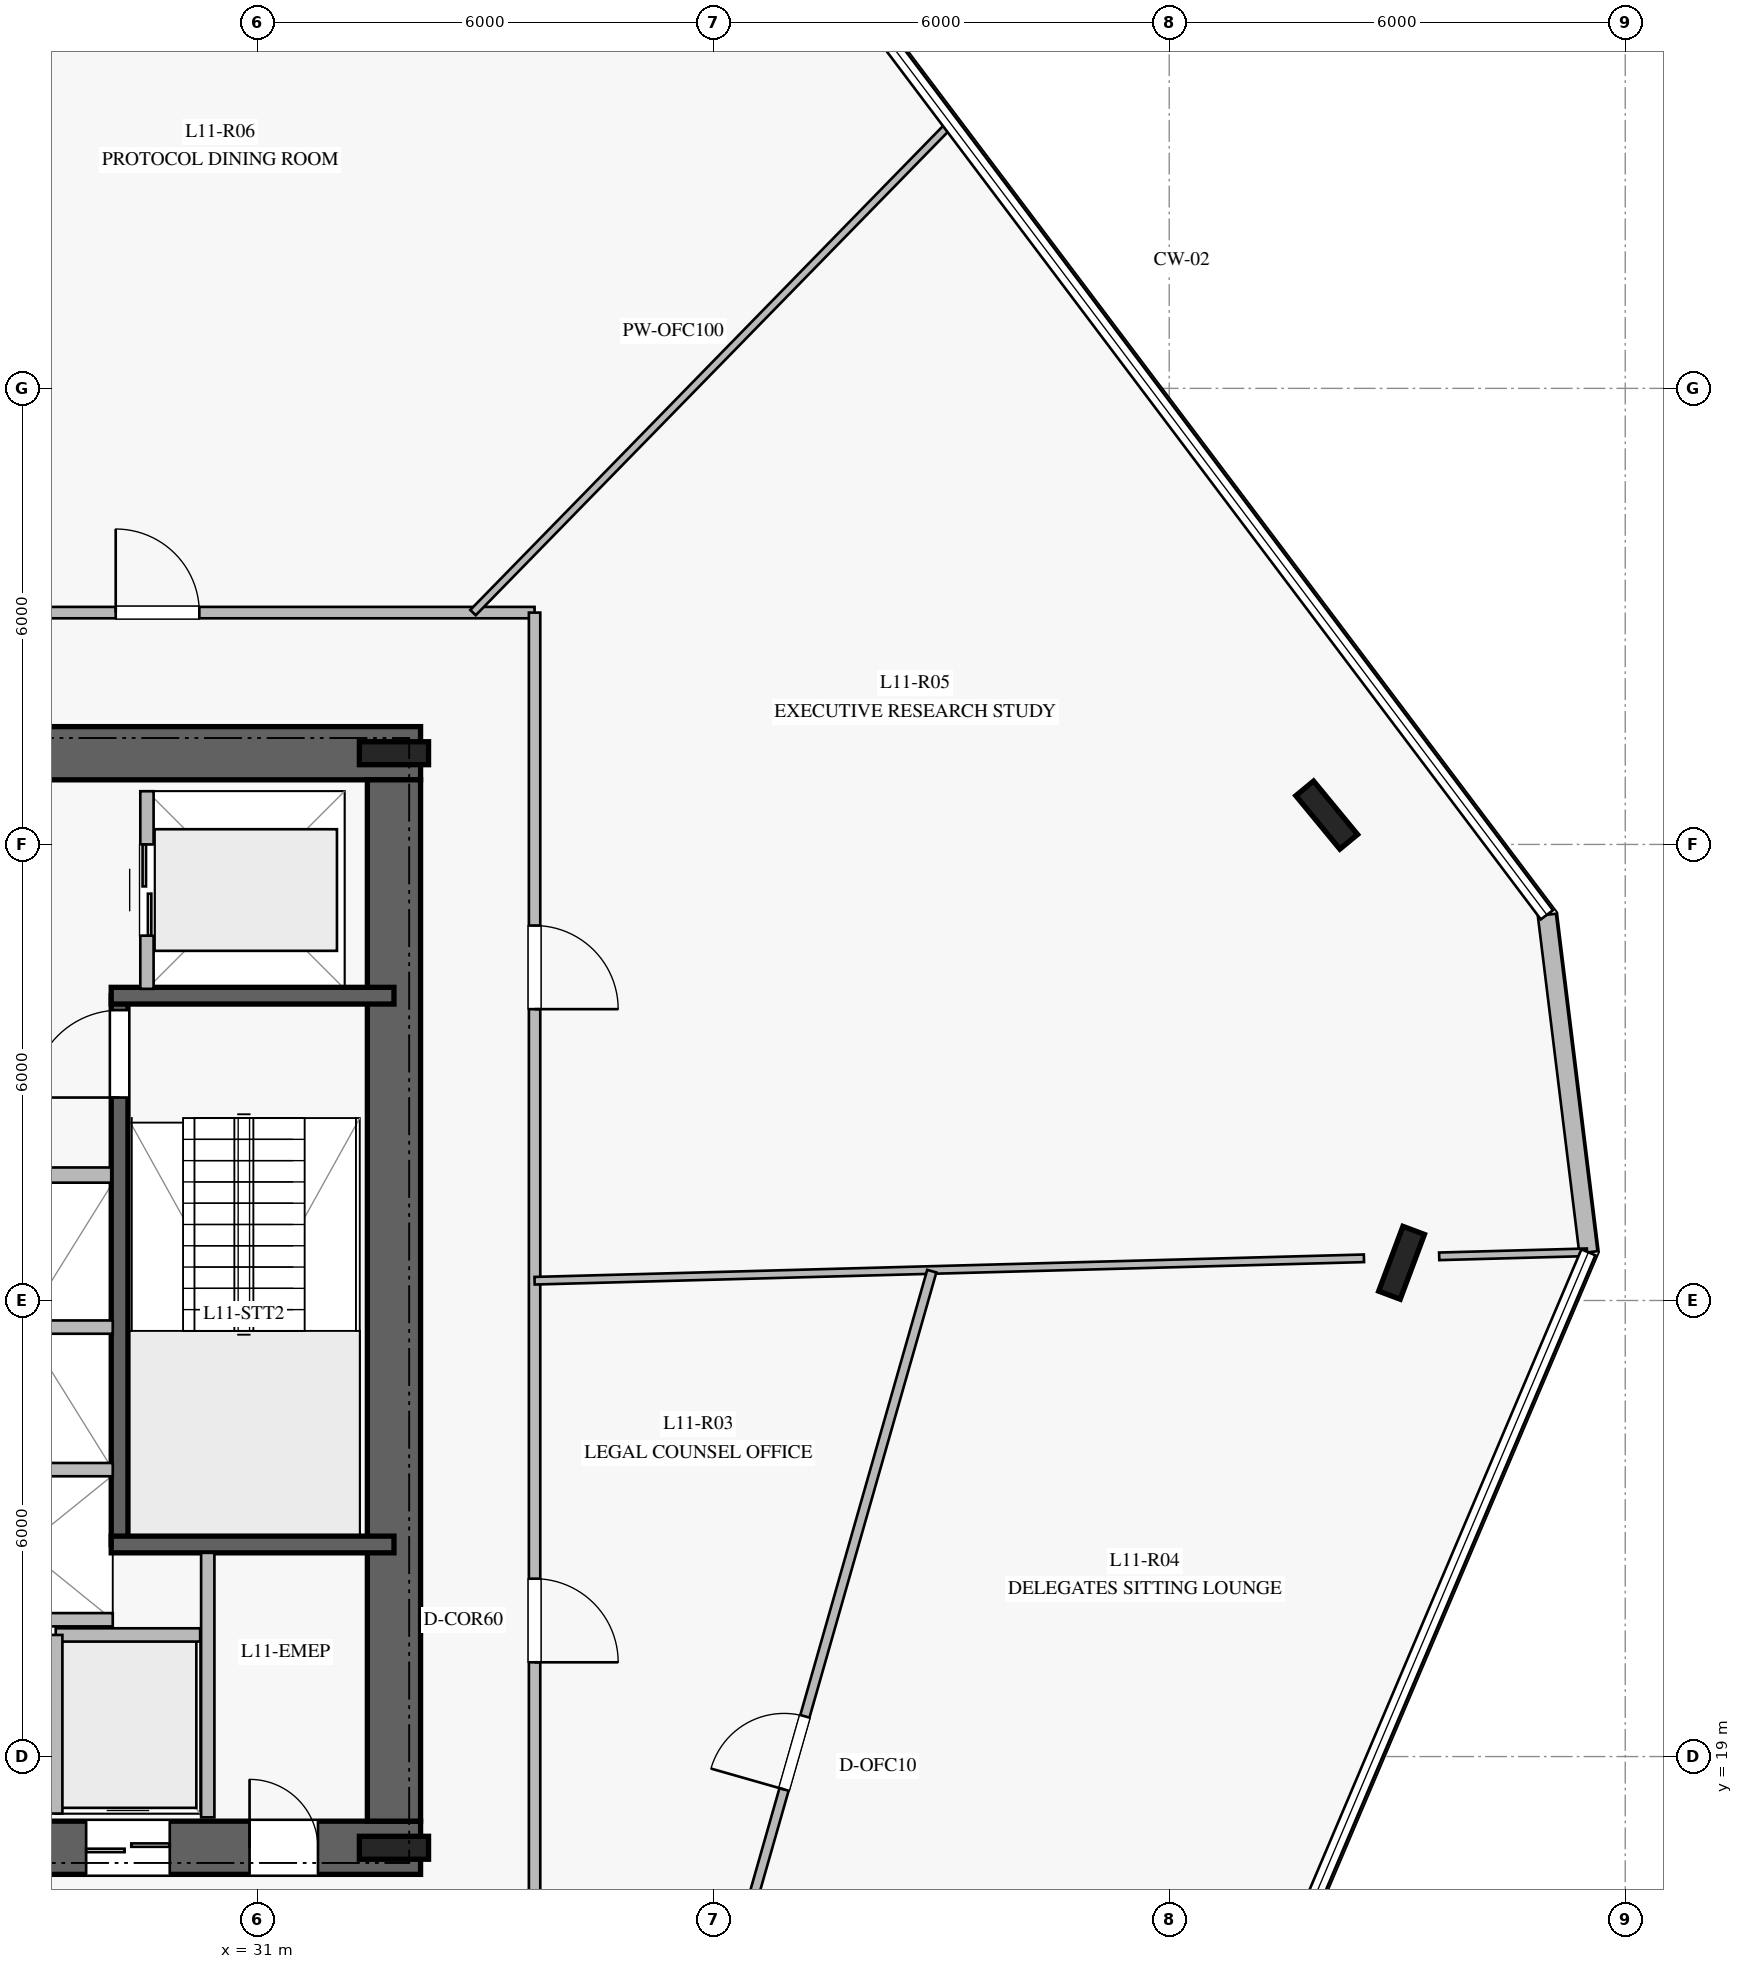
"""IFC4 building model, lengths in metres.
Left out: names, types, materials, properties, quantities, classifications, styles, units other than length and angle.
Written with IfcOpenShell. Run it as: python <this file> out.ifc"""

import sys

from ifc_helpers import new_model, si_unit, direction, frame, frame_2d, origin, origin_2d, place, context, subcontext, project, spatial, rectangle, i_section, extrude, element, fill, save


model = new_model("IFC4")
c1 = context("Model", 3, precision=1e-05, world=origin(), true_north=direction((0.0, 1.0)))
c2 = subcontext(c1, "Body", "Model", "MODEL_VIEW")
j1 = project(units=[si_unit("LENGTHUNIT", "METRE"), si_unit("PLANEANGLEUNIT", "RADIAN")], contexts=[c1])
p1 = place(None, origin())
s1 = spatial("IfcSite", under=j1, at=p1, CompositionType="ELEMENT")
p2 = place(p1, origin())
s2 = spatial("IfcBuilding", under=s1, at=p2, CompositionType="ELEMENT")
p3 = place(p2, frame((0.0, 0.0, 48.0)))
s3 = spatial("IfcBuildingStorey", under=s2, at=p3, CompositionType="ELEMENT", Elevation=48.0)
p4 = place(p3, frame((16.85, 17.8, 0.0), z_axis=(0.0, 0.0, 1.0), x_axis=(1.0, 0.0, 0.0)))
e1 = element("IfcWall", 1, at=p4, inside=s3, PredefinedType="SHEAR", context=c2, shape_type="SweptSolid", body=[
    extrude(rectangle(XDim=16.3, YDim=0.7, at=frame_2d((8.15, 0.0))), origin(), (0.0, 0.0, 1.0), 3.76),
])
p5 = place(p4, frame((5.1, 0.0, 0.0)))
e2 = element("IfcOpeningElement", 2, at=p5, cuts=e1, PredefinedType="OPENING", context=c2, shape_type="SweptSolid", body=[
    extrude(rectangle(XDim=1.2, YDim=2.25, at=frame_2d((0.6, 1.125))), frame((0.0, 0.36, 0.0), z_axis=(0.0, -1.0, 0.0), x_axis=(1.0, 0.0, 0.0)), (0.0, 0.0, 1.0), 0.72),
])
p6 = place(p4, frame((14.05, 0.0, 0.0)))
e3 = element("IfcOpeningElement", 3, at=p6, cuts=e1, PredefinedType="OPENING", context=c2, shape_type="SweptSolid", body=[
    extrude(rectangle(XDim=0.9, YDim=2.1, at=frame_2d((0.45, 1.05))), frame((0.0, 0.36, 0.0), z_axis=(0.0, -1.0, 0.0), x_axis=(1.0, 0.0, 0.0)), (0.0, 0.0, 1.0), 0.72),
])
p7 = place(p4, frame((7.95, 0.0, 0.0)))
e4 = element("IfcOpeningElement", 4, at=p7, cuts=e1, PredefinedType="OPENING", context=c2, shape_type="SweptSolid", body=[
    extrude(rectangle(XDim=1.1, YDim=2.2, at=frame_2d((0.55, 1.1))), frame((0.0, 0.36, 0.0), z_axis=(0.0, -1.0, 0.0), x_axis=(1.0, 0.0, 0.0)), (0.0, 0.0, 1.0), 0.72),
])
p8 = place(p4, frame((9.925, 0.0, 0.0)))
e5 = element("IfcOpeningElement", 5, at=p8, cuts=e1, PredefinedType="OPENING", context=c2, shape_type="SweptSolid", body=[
    extrude(rectangle(XDim=1.1, YDim=2.2, at=frame_2d((0.55, 1.1))), frame((0.0, 0.36, 0.0), z_axis=(0.0, -1.0, 0.0), x_axis=(1.0, 0.0, 0.0)), (0.0, 0.0, 1.0), 0.72),
])
p9 = place(p4, frame((11.9, 0.0, 0.0)))
e6 = element("IfcOpeningElement", 6, at=p9, cuts=e1, PredefinedType="OPENING", context=c2, shape_type="SweptSolid", body=[
    extrude(rectangle(XDim=1.1, YDim=2.2, at=frame_2d((0.55, 1.1))), frame((0.0, 0.36, 0.0), z_axis=(0.0, -1.0, 0.0), x_axis=(1.0, 0.0, 0.0)), (0.0, 0.0, 1.0), 0.72),
])
p10 = place(p3, frame((33.15, 32.2, 0.0), z_axis=(0.0, 0.0, 1.0), x_axis=(-1.0, 0.0, 0.0)))
e7 = element("IfcWall", 7, at=p10, inside=s3, PredefinedType="SHEAR", context=c2, shape_type="SweptSolid", body=[
    extrude(rectangle(XDim=16.3, YDim=0.7, at=frame_2d((8.15, 0.0))), origin(), (0.0, 0.0, 1.0), 3.76),
])
p11 = place(p10, frame((5.1, 0.0, 0.0)))
e8 = element("IfcOpeningElement", 8, at=p11, cuts=e7, PredefinedType="OPENING", context=c2, shape_type="SweptSolid", body=[
    extrude(rectangle(XDim=1.2, YDim=2.25, at=frame_2d((0.6, 1.125))), frame((0.0, 0.36, 0.0), z_axis=(0.0, -1.0, 0.0), x_axis=(1.0, 0.0, 0.0)), (0.0, 0.0, 1.0), 0.72),
])
p12 = place(p3, frame((32.8, 18.15, 0.0), z_axis=(0.0, 0.0, 1.0), x_axis=(0.0, 1.0, 0.0)))
e9 = element("IfcWall", 9, at=p12, inside=s3, PredefinedType="SHEAR", context=c2, shape_type="SweptSolid", body=[
    extrude(rectangle(XDim=13.7, YDim=0.7, at=frame_2d((6.85, 0.0))), origin(), (0.0, 0.0, 1.0), 3.76),
])
for number, where, z_axis, x_axis in (
    (10, (32.8, 17.8, 0.0), (0.0, 0.0, 1.0), (1.0, 0.0, 0.0)),
    (11, (32.8, 32.2, 0.0), (0.0, 0.0, 1.0), (1.0, 0.0, 0.0)),
):
    element("IfcColumn", number, at=place(p3, frame(where, z_axis=z_axis, x_axis=x_axis)), inside=s3, PredefinedType="COLUMN", context=c2, shape_type="SweptSolid", body=[
        extrude(i_section(OverallWidth=0.302, OverallDepth=0.91, WebThickness=0.021, FlangeThickness=0.04, at=origin_2d()), origin(), (0.0, 0.0, 1.0), 4.0),
    ])
p13 = place(p3, frame((29.19, 21.79, 0.0), z_axis=(0.0, 0.0, 1.0), x_axis=(0.0, 1.0, 0.0)))
e12 = element("IfcWall", 12, at=p13, inside=s3, PredefinedType="SOLIDWALL", context=c2, shape_type="SweptSolid", body=[
    extrude(rectangle(XDim=7.22, YDim=0.22, at=frame_2d((3.61, 0.0))), origin(), (0.0, 0.0, 1.0), 3.76),
])
p14 = place(p13, frame((5.88, 0.0, 0.0)))
e13 = element("IfcOpeningElement", 13, at=p14, cuts=e12, PredefinedType="OPENING", context=c2, shape_type="SweptSolid", body=[
    extrude(rectangle(XDim=1.15, YDim=2.2, at=frame_2d((0.575, 1.1))), frame((0.0, 0.12, 0.0), z_axis=(0.0, -1.0, 0.0), x_axis=(1.0, 0.0, 0.0)), (0.0, 0.0, 1.0), 0.24),
])
for number, where, z_axis, x_axis in (
    (14, (29.08, 21.79, 0.0), (0.0, 0.0, 1.0), (1.0, 0.0, 0.0)),
    (15, (29.08, 29.01, 0.0), (0.0, 0.0, 1.0), (1.0, 0.0, 0.0)),
):
    element("IfcWall", number, at=place(p3, frame(where, z_axis=z_axis, x_axis=x_axis)), inside=s3, PredefinedType="SOLIDWALL", context=c2, shape_type="SweptSolid", body=[
        extrude(rectangle(XDim=3.72, YDim=0.22, at=frame_2d((1.86, 0.0))), origin(), (0.0, 0.0, 1.0), 3.76),
    ])
for number, where, z_axis, x_axis in (
    (16, (45.072, 31.386, 0.0), (0.0, 0.0, 1.0), (-0.636, 0.772, 0.0)),
    (17, (46.057, 25.496, 0.0), (0.0, 0.0, 1.0), (0.35, 0.937, 0.0)),
):
    element("IfcColumn", number, at=place(p3, frame(where, z_axis=z_axis, x_axis=x_axis)), inside=s3, PredefinedType="COLUMN", context=c2, shape_type="SweptSolid", body=[
        extrude(i_section(OverallWidth=0.302, OverallDepth=0.91, WebThickness=0.021, FlangeThickness=0.04, at=origin_2d()), origin(), (0.0, 0.0, 1.0), 4.0),
    ])
p15 = place(p3, frame((48.515, 25.634, 0.0), z_axis=(0.0, 0.0, 1.0), x_axis=(-0.122032788479, 0.992526069449, 0.0)))
e18 = element("IfcWall", 18, at=p15, inside=s3, PredefinedType="STANDARD", context=c2, shape_type="SweptSolid", body=[
    extrude(rectangle(XDim=4.473, YDim=0.24, at=frame_2d((2.237, 0.0))), origin(), (0.0, 0.0, 1.0), 3.76),
])
p16 = place(p3, frame((25.7, 26.65, 0.0), z_axis=(0.0, 0.0, 1.0), x_axis=(1.0, 0.0, 0.0)))
e19 = element("IfcWall", 19, at=p16, inside=s3, PredefinedType="PARTITIONING", context=c2, shape_type="SweptSolid", body=[
    extrude(rectangle(XDim=3.38, YDim=0.2, at=frame_2d((1.69, 0.0))), origin(), (0.0, 0.0, 1.0), 3.76),
])
p17 = place(p3, frame((30.35, 18.2, 0.0), z_axis=(0.0, 0.0, 1.0), x_axis=(0.0, 1.0, 0.0)))
e20 = element("IfcWall", 20, at=p17, inside=s3, PredefinedType="PARTITIONING", context=c2, shape_type="SweptSolid", body=[
    extrude(rectangle(XDim=3.48, YDim=0.175, at=frame_2d((1.74, 0.0))), origin(), (0.0, 0.0, 1.0), 3.76),
])
p18 = place(p3, frame((28.35, 20.6, 0.0), z_axis=(0.0, 0.0, 1.0), x_axis=(1.0, 0.0, 0.0)))
e21 = element("IfcWall", 21, at=p18, inside=s3, PredefinedType="PARTITIONING", context=c2, shape_type="SweptSolid", body=[
    extrude(rectangle(XDim=1.9, YDim=0.175, at=frame_2d((0.95, 0.0))), origin(), (0.0, 0.0, 1.0), 3.76),
])
for number, where, z_axis, x_axis in (
    (22, (28.35, 18.25, 0.0), (0.0, 0.0, 1.0), (0.0, 1.0, 0.0)),
    (23, (26.75, 20.8, 0.0), (0.0, 0.0, 1.0), (1.0, 0.0, 0.0)),
    (24, (26.75, 22.775, 0.0), (0.0, 0.0, 1.0), (1.0, 0.0, 0.0)),
    (25, (26.75, 24.65, 0.0), (0.0, 0.0, 1.0), (1.0, 0.0, 0.0)),
):
    element("IfcWall", number, at=place(p3, frame(where, z_axis=z_axis, x_axis=x_axis)), inside=s3, PredefinedType="PARTITIONING", context=c2, shape_type="SweptSolid", body=[
        extrude(rectangle(XDim=2.35, YDim=0.175, at=frame_2d((1.175, 0.0))), origin(), (0.0, 0.0, 1.0), 3.76),
    ])
p19 = place(p3, frame((29.55, 29.1, 0.0), z_axis=(0.0, 0.0, 1.0), x_axis=(0.0, 1.0, 0.0)))
e26 = element("IfcWall", 26, at=p19, inside=s3, PredefinedType="PARTITIONING", context=c2, shape_type="SweptSolid", body=[
    extrude(rectangle(XDim=2.6, YDim=0.175, at=frame_2d((1.3, 0.0))), origin(), (0.0, 0.0, 1.0), 3.76),
])
p20 = place(p19, frame((0.7, 0.0, 0.0)))
e27 = element("IfcOpeningElement", 27, at=p20, cuts=e26, PredefinedType="OPENING", context=c2, shape_type="SweptSolid", body=[
    extrude(rectangle(XDim=1.2, YDim=2.2, at=frame_2d((0.6, 1.1))), frame((0.0, 0.098, 0.0), z_axis=(0.0, -1.0, 0.0), x_axis=(1.0, 0.0, 0.0)), (0.0, 0.0, 1.0), 0.195),
])
p21 = place(p3, frame((15.35, 34.05, 0.0), z_axis=(0.0, 0.0, 1.0), x_axis=(1.0, 0.0, 0.0)))
e28 = element("IfcWall", 28, at=p21, inside=s3, PredefinedType="PARTITIONING", context=c2, shape_type="SweptSolid", body=[
    extrude(rectangle(XDim=19.3, YDim=0.15, at=frame_2d((9.65, 0.0))), origin(), (0.0, 0.0, 1.0), 3.21),
])
p22 = place(p21, frame((13.789, 0.0, 0.0)))
e29 = element("IfcOpeningElement", 29, at=p22, cuts=e28, PredefinedType="OPENING", context=c2, shape_type="SweptSolid", body=[
    extrude(rectangle(XDim=1.1, YDim=2.2, at=frame_2d((0.55, 1.1))), frame((0.0, 0.085, 0.0), z_axis=(0.0, -1.0, 0.0), x_axis=(1.0, 0.0, 0.0)), (0.0, 0.0, 1.0), 0.17),
])
p23 = place(p21, frame((4.592, 0.0, 0.0)))
e30 = element("IfcOpeningElement", 30, at=p23, cuts=e28, PredefinedType="OPENING", context=c2, shape_type="SweptSolid", body=[
    extrude(rectangle(XDim=1.1, YDim=2.2, at=frame_2d((0.55, 1.1))), frame((0.0, 0.085, 0.0), z_axis=(0.0, -1.0, 0.0), x_axis=(1.0, 0.0, 0.0)), (0.0, 0.0, 1.0), 0.17),
])
p24 = place(p3, frame((34.65, 34.05, 0.0), z_axis=(0.0, 0.0, 1.0), x_axis=(0.0, -1.0, 0.0)))
e31 = element("IfcWall", 31, at=p24, inside=s3, PredefinedType="PARTITIONING", context=c2, shape_type="SweptSolid", body=[
    extrude(rectangle(XDim=18.1, YDim=0.15, at=frame_2d((9.05, 0.0))), origin(), (0.0, 0.0, 1.0), 3.21),
])
p25 = place(p24, frame((12.71, 0.0, 0.0)))
e32 = element("IfcOpeningElement", 32, at=p25, cuts=e31, PredefinedType="OPENING", context=c2, shape_type="SweptSolid", body=[
    extrude(rectangle(XDim=1.1, YDim=2.2, at=frame_2d((0.55, 1.1))), frame((0.0, 0.085, 0.0), z_axis=(0.0, -1.0, 0.0), x_axis=(1.0, 0.0, 0.0)), (0.0, 0.0, 1.0), 0.17),
])
p26 = place(p24, frame((4.117, 0.0, 0.0)))
e33 = element("IfcOpeningElement", 33, at=p26, cuts=e31, PredefinedType="OPENING", context=c2, shape_type="SweptSolid", body=[
    extrude(rectangle(XDim=1.1, YDim=2.2, at=frame_2d((0.55, 1.1))), frame((0.0, 0.085, 0.0), z_axis=(0.0, -1.0, 0.0), x_axis=(1.0, 0.0, 0.0)), (0.0, 0.0, 1.0), 0.17),
])
p27 = place(p3, frame((33.84, 34.05, 0.0), z_axis=(0.0, 0.0, 1.0), x_axis=(0.698762183729, 0.715354045624, 0.0)))
e34 = element("IfcWall", 34, at=p27, inside=s3, PredefinedType="MOVABLE", context=c2, shape_type="SweptSolid", body=[
    extrude(rectangle(XDim=8.976, YDim=0.1, at=frame_2d((4.488, 0.0))), origin(), (0.0, 0.0, 1.0), 3.02),
])
p28 = place(p3, frame((34.65, 25.26, 0.0), z_axis=(0.0, 0.0, 1.0), x_axis=(0.999634969873, 0.027017161348, 0.0)))
e35 = element("IfcWall", 35, at=p28, inside=s3, PredefinedType="MOVABLE", context=c2, shape_type="SweptSolid", body=[
    extrude(rectangle(XDim=10.916, YDim=0.1, at=frame_2d((5.458, 0.0))), origin(), (0.0, 0.0, 1.0), 3.21),
])
p29 = place(p3, frame((46.552, 25.581, 0.0), z_axis=(0.0, 0.0, 1.0), x_axis=(0.999628897196, 0.027240923106, 0.0)))
e36 = element("IfcWall", 36, at=p29, inside=s3, PredefinedType="MOVABLE", context=c2, shape_type="SweptSolid", body=[
    extrude(rectangle(XDim=1.945, YDim=0.1, at=frame_2d((0.972, 0.0))), origin(), (0.0, 0.0, 1.0), 3.76),
])
p30 = place(p3, frame((36.263, 12.712, 0.0), z_axis=(0.0, 0.0, 1.0), x_axis=(0.27415099994, 0.961686658549, 0.0)))
e37 = element("IfcWall", 37, at=p30, inside=s3, PredefinedType="PARTITIONING", context=c2, shape_type="SweptSolid", body=[
    extrude(rectangle(XDim=13.179, YDim=0.125, at=frame_2d((6.589, 0.0))), origin(), (0.0, 0.0, 1.0), 3.21),
])
p31 = place(p30, frame((6.089, 0.0, 0.0)))
e38 = element("IfcOpeningElement", 38, at=p31, cuts=e37, PredefinedType="OPENING", context=c2, shape_type="SweptSolid", body=[
    extrude(rectangle(XDim=1.0, YDim=2.15, at=frame_2d((0.5, 1.075))), frame((0.0, 0.073, 0.0), z_axis=(0.0, -1.0, 0.0), x_axis=(1.0, 0.0, 0.0)), (0.0, 0.0, 1.0), 0.145),
])
p32 = place(p14, origin())
e39 = element("IfcDoor", 39, at=p32, inside=s3, OperationType="SINGLE_SWING_LEFT", PredefinedType="DOOR", context=c2, shape_type="SweptSolid", body=[
    extrude(rectangle(XDim=1.15, YDim=2.2, at=frame_2d((0.575, 1.1))), frame((0.0, 0.025, 0.0), z_axis=(0.0, -1.0, 0.0), x_axis=(1.0, 0.0, 0.0)), (0.0, 0.0, 1.0), 0.05),
])
fill(e13, e39)
p33 = place(p6, origin())
e40 = element("IfcDoor", 40, at=p33, inside=s3, OperationType="SINGLE_SWING_LEFT", PredefinedType="DOOR", context=c2, shape_type="SweptSolid", body=[
    extrude(rectangle(XDim=0.9, YDim=2.1, at=frame_2d((0.45, 1.05))), frame((0.0, 0.025, 0.0), z_axis=(0.0, -1.0, 0.0), x_axis=(1.0, 0.0, 0.0)), (0.0, 0.0, 1.0), 0.05),
])
fill(e3, e40)
p34 = place(p9, origin())
e41 = element("IfcDoor", 41, at=p34, inside=s3, OperationType="DOUBLE_DOOR_SLIDING", PredefinedType="DOOR", context=c2, shape_type="SweptSolid", body=[
    extrude(rectangle(XDim=1.1, YDim=2.2, at=frame_2d((0.55, 1.1))), frame((0.0, 0.025, 0.0), z_axis=(0.0, -1.0, 0.0), x_axis=(1.0, 0.0, 0.0)), (0.0, 0.0, 1.0), 0.05),
])
fill(e6, e41)
p35 = place(p20, origin())
e42 = element("IfcDoor", 42, at=p35, inside=s3, OperationType="DOUBLE_DOOR_SLIDING", PredefinedType="DOOR", context=c2, shape_type="SweptSolid", body=[
    extrude(rectangle(XDim=1.2, YDim=2.2, at=frame_2d((0.6, 1.1))), frame((0.0, 0.025, 0.0), z_axis=(0.0, -1.0, 0.0), x_axis=(1.0, 0.0, 0.0)), (0.0, 0.0, 1.0), 0.05),
])
fill(e27, e42)
p36 = place(p25, origin())
e43 = element("IfcDoor", 43, at=p36, inside=s3, OperationType="SINGLE_SWING_RIGHT", PredefinedType="DOOR", context=c2, shape_type="SweptSolid", body=[
    extrude(rectangle(XDim=1.1, YDim=2.2, at=frame_2d((0.55, 1.1))), frame((0.0, 0.025, 0.0), z_axis=(0.0, -1.0, 0.0), x_axis=(1.0, 0.0, 0.0)), (0.0, 0.0, 1.0), 0.05),
])
fill(e32, e43)
p37 = place(p31, origin())
e44 = element("IfcDoor", 44, at=p37, inside=s3, OperationType="SINGLE_SWING_LEFT", PredefinedType="DOOR", context=c2, shape_type="SweptSolid", body=[
    extrude(rectangle(XDim=1.0, YDim=2.15, at=frame_2d((0.5, 1.075))), frame((0.0, 0.025, 0.0), z_axis=(0.0, -1.0, 0.0), x_axis=(1.0, 0.0, 0.0)), (0.0, 0.0, 1.0), 0.05),
])
fill(e38, e44)
p38 = place(p26, origin())
e45 = element("IfcDoor", 45, at=p38, inside=s3, OperationType="SINGLE_SWING_RIGHT", PredefinedType="DOOR", context=c2, shape_type="SweptSolid", body=[
    extrude(rectangle(XDim=1.1, YDim=2.2, at=frame_2d((0.55, 1.1))), frame((0.0, 0.025, 0.0), z_axis=(0.0, -1.0, 0.0), x_axis=(1.0, 0.0, 0.0)), (0.0, 0.0, 1.0), 0.05),
])
fill(e33, e45)
p39 = place(p22, origin())
e46 = element("IfcDoor", 46, at=p39, inside=s3, OperationType="SINGLE_SWING_LEFT", PredefinedType="DOOR", context=c2, shape_type="SweptSolid", body=[
    extrude(rectangle(XDim=1.1, YDim=2.2, at=frame_2d((0.55, 1.1))), frame((0.0, 0.025, 0.0), z_axis=(0.0, -1.0, 0.0), x_axis=(1.0, 0.0, 0.0)), (0.0, 0.0, 1.0), 0.05),
])
fill(e29, e46)
save(model, sys.argv[1])
